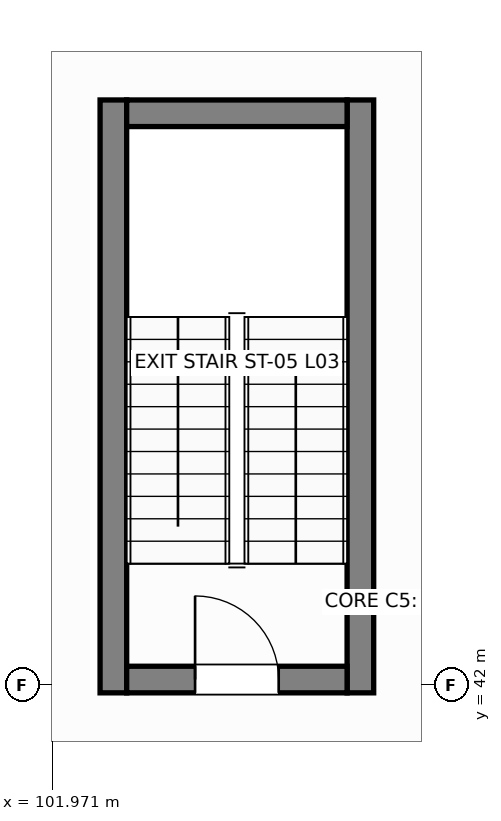
"""IFC4 building model, lengths in metres.
Left out: names, types, materials, properties, quantities, classifications, styles, units other than length and angle.
Written with IfcOpenShell. Run it as: python <this file> out.ifc"""

import sys

from ifc_helpers import new_model, si_unit, direction, frame, frame_2d, origin, place, context, subcontext, project, spatial, rectangle, extrude, element, fill, save


model = new_model("IFC4")
c1 = context("Model", 3, precision=1e-05, world=origin(), true_north=direction((0.0, 1.0)))
c2 = subcontext(c1, "Body", "Model", "MODEL_VIEW")
j1 = project(units=[si_unit("LENGTHUNIT", "METRE"), si_unit("PLANEANGLEUNIT", "RADIAN")], contexts=[c1])
p1 = place(None, origin())
s1 = spatial("IfcSite", under=j1, at=p1, CompositionType="ELEMENT")
p2 = place(p1, origin())
s2 = spatial("IfcBuilding", under=s1, at=p2, CompositionType="ELEMENT")
p3 = place(p2, frame((0.0, 0.0, 13.2)))
s3 = spatial("IfcBuildingStorey", under=s2, at=p3, CompositionType="ELEMENT", Elevation=13.2)
for number, where, z_axis, x_axis in (
    (1, (102.775, 41.9, 0.0), (0.0, 0.0, 1.0), (0.0, 1.0, 0.0)),
    (2, (106.025, 41.9, 0.0), (0.0, 0.0, 1.0), (0.0, 1.0, 0.0)),
):
    element("IfcWall", number, at=place(p3, frame(where, z_axis=z_axis, x_axis=x_axis)), inside=s3, PredefinedType="SHEAR", context=c2, shape_type="SweptSolid", body=[
        extrude(rectangle(XDim=7.8, YDim=0.35, at=frame_2d((3.9, 0.0))), origin(), (0.0, 0.0, 1.0), 3.99),
    ])
p4 = place(p3, frame((102.95, 49.525, 0.0), z_axis=(0.0, 0.0, 1.0), x_axis=(1.0, 0.0, 0.0)))
e3 = element("IfcWall", 3, at=p4, inside=s3, PredefinedType="SHEAR", context=c2, shape_type="SweptSolid", body=[
    extrude(rectangle(XDim=2.9, YDim=0.35, at=frame_2d((1.45, 0.0))), origin(), (0.0, 0.0, 1.0), 3.99),
])
p5 = place(p3, frame((102.95, 42.075, 0.0), z_axis=(0.0, 0.0, 1.0), x_axis=(1.0, 0.0, 0.0)))
e4 = element("IfcWall", 4, at=p5, inside=s3, PredefinedType="SHEAR", context=c2, shape_type="SweptSolid", body=[
    extrude(rectangle(XDim=2.9, YDim=0.35, at=frame_2d((1.45, 0.0))), origin(), (0.0, 0.0, 1.0), 3.99),
])
p6 = place(p5, frame((0.9, 0.0, 0.0)))
e5 = element("IfcOpeningElement", 5, at=p6, cuts=e4, PredefinedType="OPENING", context=c2, shape_type="SweptSolid", body=[
    extrude(rectangle(XDim=1.1, YDim=2.15, at=frame_2d((0.55, 1.075))), frame((0.0, 0.185, 0.0), z_axis=(0.0, -1.0, 0.0), x_axis=(1.0, 0.0, 0.0)), (0.0, 0.0, 1.0), 0.37),
])
p7 = place(p6, origin())
e6 = element("IfcDoor", 6, at=p7, inside=s3, OperationType="SINGLE_SWING_LEFT", PredefinedType="DOOR", context=c2, shape_type="SweptSolid", body=[
    extrude(rectangle(XDim=1.1, YDim=2.15, at=frame_2d((0.55, 1.075))), frame((0.0, 0.025, 0.0), z_axis=(0.0, -1.0, 0.0), x_axis=(1.0, 0.0, 0.0)), (0.0, 0.0, 1.0), 0.05),
])
fill(e5, e6)
save(model, sys.argv[1])
